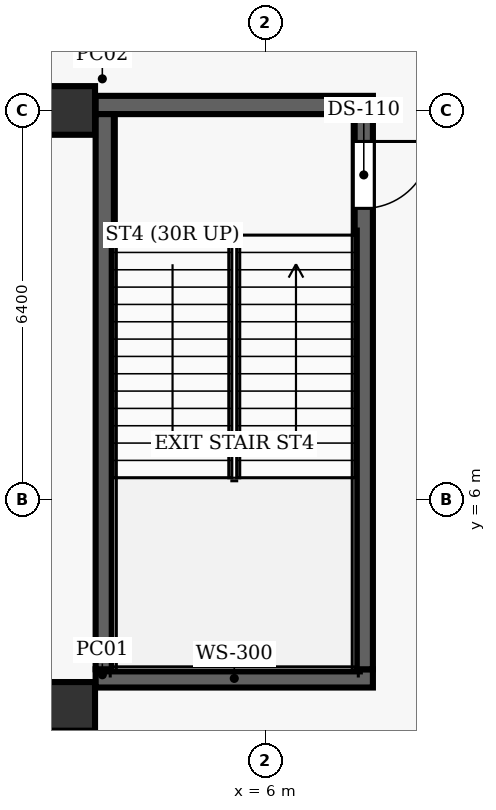
"""IFC4 building model, lengths in metres.
Left out: names, types, materials, properties, quantities, classifications, styles, units other than length and angle.
Written with IfcOpenShell. Run it as: python <this file> out.ifc"""

import sys

from ifc_helpers import new_model, si_unit, direction, frame, frame_2d, origin, origin_2d, place, context, subcontext, project, spatial, rectangle, extrude, element, fill, save


model = new_model("IFC4")
c1 = context("Model", 3, precision=1e-05, world=origin(), true_north=direction((0.0, 1.0)))
c2 = subcontext(c1, "Body", "Model", "MODEL_VIEW")
j1 = project(units=[si_unit("LENGTHUNIT", "METRE"), si_unit("PLANEANGLEUNIT", "RADIAN")], contexts=[c1])
p1 = place(None, origin())
s1 = spatial("IfcSite", under=j1, at=p1, CompositionType="ELEMENT")
p2 = place(p1, origin())
s2 = spatial("IfcBuilding", under=s1, at=p2, CompositionType="ELEMENT")
p3 = place(p2, frame((0.0, 0.0, 6.6)))
s3 = spatial("IfcBuildingStorey", under=s2, at=p3, CompositionType="ELEMENT", Elevation=6.6)
for number, where, z_axis, x_axis in (
    (1, (2.8, 2.6, 0.0), (0.0, 0.0, 1.0), (1.0, 0.0, 0.0)),
    (2, (2.8, 12.4, 0.0), (0.0, 0.0, 1.0), (1.0, 0.0, 0.0)),
):
    element("IfcColumn", number, at=place(p3, frame(where, z_axis=z_axis, x_axis=x_axis)), inside=s3, PredefinedType="COLUMN", context=c2, shape_type="SweptSolid", body=[
        extrude(rectangle(XDim=0.8, YDim=0.8, at=origin_2d()), origin(), (0.0, 0.0, 1.0), 5.4),
    ])
for number, where, z_axis, x_axis in (
    (3, (3.21, 3.06, 0.0), (0.0, 0.0, 1.0), (1.0, 0.0, 0.0)),
    (4, (3.21, 12.49, 0.0), (0.0, 0.0, 1.0), (1.0, 0.0, 0.0)),
):
    element("IfcWall", number, at=place(p3, frame(where, z_axis=z_axis, x_axis=x_axis)), inside=s3, PredefinedType="SHEAR", context=c2, shape_type="SweptSolid", body=[
        extrude(rectangle(XDim=4.56, YDim=0.3, at=frame_2d((2.28, 0.0))), origin(), (0.0, 0.0, 1.0), 5.4),
    ])
p4 = place(p3, frame((3.36, 3.21, 0.0), z_axis=(0.0, 0.0, 1.0), x_axis=(0.0, 1.0, 0.0)))
e5 = element("IfcWall", 5, at=p4, inside=s3, PredefinedType="SHEAR", context=c2, shape_type="SweptSolid", body=[
    extrude(rectangle(XDim=9.13, YDim=0.3, at=frame_2d((4.565, 0.0))), origin(), (0.0, 0.0, 1.0), 5.4),
])
p5 = place(p3, frame((7.62, 12.34, 0.0), z_axis=(0.0, 0.0, 1.0), x_axis=(0.0, -1.0, 0.0)))
e6 = element("IfcWall", 6, at=p5, inside=s3, PredefinedType="SHEAR", context=c2, shape_type="SweptSolid", body=[
    extrude(rectangle(XDim=9.13, YDim=0.3, at=frame_2d((4.565, 0.0))), origin(), (0.0, 0.0, 1.0), 5.4),
])
p6 = place(p5, frame((0.45, 0.0, 0.0)))
e7 = element("IfcOpeningElement", 7, at=p6, cuts=e6, PredefinedType="OPENING", context=c2, shape_type="SweptSolid", body=[
    extrude(rectangle(XDim=1.1, YDim=2.15, at=frame_2d((0.55, 1.075))), frame((0.0, 0.16, 0.0), z_axis=(0.0, -1.0, 0.0), x_axis=(1.0, 0.0, 0.0)), (0.0, 0.0, 1.0), 0.32),
])
p7 = place(p6, origin())
e8 = element("IfcDoor", 8, at=p7, inside=s3, OperationType="SINGLE_SWING_LEFT", PredefinedType="DOOR", context=c2, shape_type="SweptSolid", body=[
    extrude(rectangle(XDim=1.1, YDim=2.15, at=frame_2d((0.55, 1.075))), frame((0.0, 0.025, 0.0), z_axis=(0.0, -1.0, 0.0), x_axis=(1.0, 0.0, 0.0)), (0.0, 0.0, 1.0), 0.05),
])
fill(e7, e8)
save(model, sys.argv[1])
